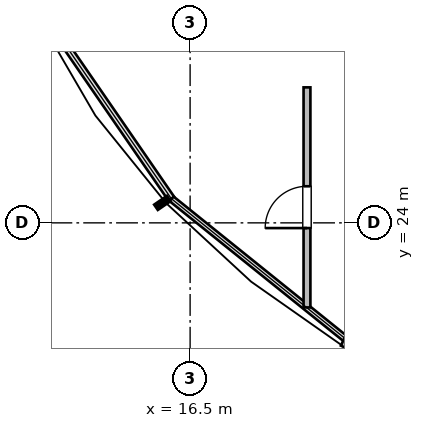
"""IFC4 building model, lengths in metres.
Left out: names, types, materials, properties, quantities, classifications, styles, units other than length and angle.
Written with IfcOpenShell. Run it as: python <this file> out.ifc"""

import sys

from ifc_helpers import new_model, si_unit, direction, frame, frame_2d, origin, place, context, subcontext, project, spatial, rectangle, extrude, element, fill, save


model = new_model("IFC4")
c1 = context("Model", 3, precision=1e-05, world=origin(), true_north=direction((0.0, 1.0)))
c2 = subcontext(c1, "Body", "Model", "MODEL_VIEW")
j1 = project(units=[si_unit("LENGTHUNIT", "METRE"), si_unit("PLANEANGLEUNIT", "RADIAN")], contexts=[c1])
p1 = place(None, origin())
s1 = spatial("IfcSite", under=j1, at=p1, CompositionType="ELEMENT")
p2 = place(p1, origin())
s2 = spatial("IfcBuilding", under=s1, at=p2, CompositionType="ELEMENT")
p3 = place(p2, frame((0.0, 0.0, 167.4)))
s3 = spatial("IfcBuildingStorey", under=s2, at=p3, CompositionType="ELEMENT", Elevation=167.4)
p4 = place(p3, frame((26.994, 17.88, 0.0), z_axis=(0.0, 0.0, 1.0), x_axis=(-0.905106920297, 0.425184034073, 0.0)))
e1 = element("IfcWall", 1, at=p4, inside=s3, PredefinedType="STANDARD", context=c2, shape_type="SweptSolid", body=[
    extrude(rectangle(XDim=7.136, YDim=0.32, at=frame_2d((3.568, 0.0))), origin(), (0.0, 0.0, 1.0), 2.657),
])
p5 = place(p3, frame((19.575, 21.775, 0.0), z_axis=(0.0, 0.0, 1.0), x_axis=(0.0, 1.0, 0.0)))
e2 = element("IfcWall", 2, at=p5, inside=s3, PredefinedType="PARTITIONING", context=c2, shape_type="SweptSolid", body=[
    extrude(rectangle(XDim=5.79, YDim=0.18, at=frame_2d((2.895, 0.0))), origin(), (0.0, 0.0, 1.0), 3.36),
])
p6 = place(p5, frame((2.088, 0.0, 0.0)))
e3 = element("IfcOpeningElement", 3, at=p6, cuts=e2, PredefinedType="OPENING", context=c2, shape_type="SweptSolid", body=[
    extrude(rectangle(XDim=1.1, YDim=2.1, at=frame_2d((0.55, 1.05))), frame((0.0, 0.1, 0.0), z_axis=(0.0, -1.0, 0.0), x_axis=(1.0, 0.0, 0.0)), (0.0, 0.0, 1.0), 0.2),
])
p7 = place(p6, origin())
e4 = element("IfcDoor", 4, at=p7, inside=s3, OperationType="SINGLE_SWING_LEFT", PredefinedType="DOOR", context=c2, shape_type="SweptSolid", body=[
    extrude(rectangle(XDim=1.1, YDim=2.1, at=frame_2d((0.55, 1.05))), frame((0.0, 0.025, 0.0), z_axis=(0.0, -1.0, 0.0), x_axis=(1.0, 0.0, 0.0)), (0.0, 0.0, 1.0), 0.05),
])
fill(e3, e4)
save(model, sys.argv[1])
